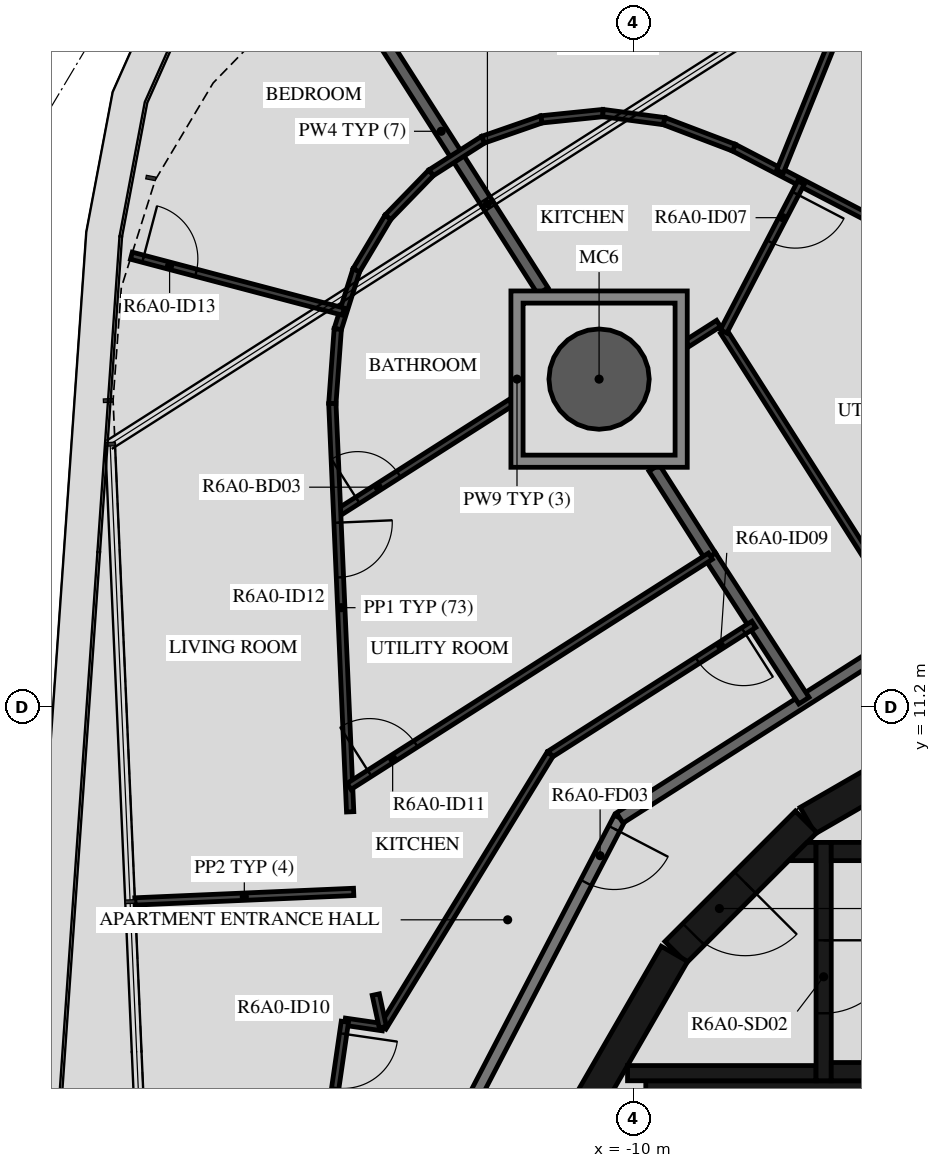
"""IFC4 building model, lengths in metres.
Left out: names, types, materials, properties, quantities, classifications, styles, units other than length and angle.
Written with IfcOpenShell. Run it as: python <this file> out.ifc"""

import sys

from ifc_helpers import new_model, si_unit, direction, frame, frame_2d, origin, origin_2d, place, context, subcontext, project, spatial, polyline, rectangle, hollow_circle, outline, extrude, element, fill, save


model = new_model("IFC4")
c1 = context("Model", 3, precision=1e-05, world=origin(), true_north=direction((0.0, 1.0)))
c2 = subcontext(c1, "Body", "Model", "MODEL_VIEW")
j1 = project(units=[si_unit("LENGTHUNIT", "METRE"), si_unit("PLANEANGLEUNIT", "RADIAN")], contexts=[c1])
p1 = place(None, origin())
s1 = spatial("IfcSite", under=j1, at=p1, CompositionType="ELEMENT")
p2 = place(p1, origin())
s2 = spatial("IfcBuilding", under=s1, at=p2, CompositionType="ELEMENT")
p3 = place(p2, frame((0.0, 0.0, 226.7)))
s3 = spatial("IfcBuildingStorey", under=s2, at=p3, CompositionType="ELEMENT", Elevation=226.7)
p4 = place(p3, frame((-10.568, 16.588, -0.45), z_axis=(0.0, 0.0, 1.0), x_axis=(1.0, 0.0, 0.0)))
e1 = element("IfcColumn", 1, at=p4, inside=s3, PredefinedType="COLUMN", context=c2, shape_type="SweptSolid", body=[
    extrude(hollow_circle(Radius=0.825, WallThickness=0.04, at=origin_2d()), origin(), (0.0, 0.0, 1.0), 3.57),
])
p5 = place(p3, frame((-4.51, 10.845, 0.0), z_axis=(0.0, 0.0, 1.0), x_axis=(-0.865975092491, -0.500087131594, 0.0)))
e2 = element("IfcWall", 2, at=p5, inside=s3, PredefinedType="SHEAR", context=c2, shape_type="SweptSolid", body=[
    extrude(rectangle(XDim=3.033, YDim=0.5, at=frame_2d((1.516, 0.0))), origin(), (0.0, 0.0, 1.0), 3.12),
])
p6 = place(p3, frame((-7.164, 9.308, 0.0), z_axis=(0.0, 0.0, 1.0), x_axis=(-0.707106781187, -0.707106781187, 0.0)))
e3 = element("IfcWall", 3, at=p6, inside=s3, PredefinedType="SHEAR", context=c2, shape_type="SweptSolid", body=[
    extrude(rectangle(XDim=3.032, YDim=0.5, at=frame_2d((1.516, 0.0))), origin(), (0.0, 0.0, 1.0), 3.12),
])
p7 = place(p6, frame((1.416, 0.0, 0.0)))
e4 = element("IfcOpeningElement", 4, at=p7, cuts=e3, PredefinedType="OPENING", context=c2, shape_type="SweptSolid", body=[
    extrude(rectangle(XDim=1.2, YDim=2.1, at=frame_2d((0.6, 1.05))), frame((0.0, 0.26, 0.0), z_axis=(0.0, -1.0, 0.0), x_axis=(1.0, 0.0, 0.0)), (0.0, 0.0, 1.0), 0.52),
])
p8 = place(p3, frame((-9.329, 7.137, 0.0), z_axis=(0.0, 0.0, 1.0), x_axis=(-0.500087131594, -0.865975092491, 0.0)))
e5 = element("IfcWall", 5, at=p8, inside=s3, PredefinedType="SHEAR", context=c2, shape_type="SweptSolid", body=[
    extrude(rectangle(XDim=3.033, YDim=0.5, at=frame_2d((1.516, 0.0))), origin(), (0.0, 0.0, 1.0), 3.12),
])
for number, where, z_axis, x_axis in (
    (6, (-6.75, 5.2, 0.0), (0.0, 0.0, 1.0), (1.0, 0.0, 0.0)),
    (7, (-6.75, 8.82, 0.0), (0.0, 0.0, 1.0), (1.0, 0.0, 0.0)),
):
    element("IfcWall", number, at=place(p3, frame(where, z_axis=z_axis, x_axis=x_axis)), inside=s3, PredefinedType="SHEAR", context=c2, shape_type="SweptSolid", body=[
        extrude(rectangle(XDim=6.75, YDim=0.3, at=frame_2d((3.375, 0.0))), origin(), (0.0, 0.0, 1.0), 3.12),
    ])
p9 = place(p3, frame((-6.875, 8.97, 0.0), z_axis=(0.0, 0.0, 1.0), x_axis=(0.0, -1.0, 0.0)))
e8 = element("IfcWall", 8, at=p9, inside=s3, PredefinedType="SHEAR", context=c2, shape_type="SweptSolid", body=[
    extrude(rectangle(XDim=3.92, YDim=0.25, at=frame_2d((1.96, 0.0))), origin(), (0.0, 0.0, 1.0), 3.12),
])
p10 = place(p9, frame((1.61, 0.0, 0.0)))
e9 = element("IfcOpeningElement", 9, at=p10, cuts=e8, PredefinedType="OPENING", context=c2, shape_type="SweptSolid", body=[
    extrude(rectangle(XDim=1.2, YDim=2.1, at=frame_2d((0.6, 1.05))), frame((0.0, 0.135, 0.0), z_axis=(0.0, -1.0, 0.0), x_axis=(1.0, 0.0, 0.0)), (0.0, 0.0, 1.0), 0.27),
])
p11 = place(p3, frame((-7.0, 5.175, 0.0), z_axis=(0.0, 0.0, 1.0), x_axis=(-1.0, 0.0, 0.0)))
e10 = element("IfcWall", 10, at=p11, inside=s3, PredefinedType="SHEAR", context=c2, shape_type="SweptSolid", body=[
    extrude(rectangle(XDim=3.1, YDim=0.25, at=frame_2d((1.55, 0.0))), origin(), (0.0, 0.0, 1.0), 3.12),
])
p12 = place(p3, origin())
e11 = element("IfcWall", 11, at=p12, inside=s3, PredefinedType="SHEAR", context=c2, shape_type="SweptSolid", body=[
    extrude(outline(polyline([(-7.148, 8.97), (-7.0, 8.97), (-7.0, 8.67), (-7.448, 8.67), (-7.148, 8.97)])), origin(), (0.0, 0.0, 1.0), 3.12),
])
p13 = place(p3, origin())
e12 = element("IfcWall", 12, at=p13, inside=s3, PredefinedType="SHEAR", context=c2, shape_type="SweptSolid", body=[
    extrude(outline(polyline([(-9.55, 4.8), (-5.5, 4.8), (-5.5, 1.9), (-5.25, 1.9), (-5.25, 4.8), (-1.2, 4.8), (-1.2, 1.9), (-0.95, 1.9), (-0.95, 4.8), (0.95, 4.8), (0.95, 1.9), (1.2, 1.9), (1.2, 4.8), (3.1, 4.8), (3.1, 1.9), (3.35, 1.9), (3.35, 4.8), (5.25, 4.8), (5.25, 1.9), (5.5, 1.9), (5.5, 4.8), (7.4, 4.8), (7.4, 1.9), (7.65, 1.9), (7.65, 4.8), (9.55, 4.8), (9.55, 1.9), (9.8, 1.9), (9.8, 4.8), (9.8, 5.05), (-9.8, 5.05), (-9.8, 4.8), (-9.8, 1.9), (-9.55, 1.9), (-9.55, 4.8)])), origin(), (0.0, 0.0, 1.0), 3.12),
])
p14 = place(p3, frame((-10.228, 9.372, 0.0), z_axis=(0.0, 0.0, 1.0), x_axis=(-0.461759464021, -0.887005184532, 0.0)))
e13 = element("IfcWall", 13, at=p14, inside=s3, PredefinedType="STANDARD", context=c2, shape_type="SweptSolid", body=[
    extrude(rectangle(XDim=7.181, YDim=0.2, at=frame_2d((3.591, 0.0))), origin(), (0.0, 0.0, 1.0), 3.12),
])
p15 = place(p14, frame((0.2, 0.0, 0.0)))
e14 = element("IfcOpeningElement", 14, at=p15, cuts=e13, PredefinedType="OPENING", context=c2, shape_type="SweptSolid", body=[
    extrude(rectangle(XDim=1.0, YDim=2.1, at=frame_2d((0.5, 1.05))), frame((0.0, 0.11, 0.0), z_axis=(0.0, -1.0, 0.0), x_axis=(1.0, 0.0, 0.0)), (0.0, 0.0, 1.0), 0.22),
])
p16 = place(p3, frame((-4.172, 13.231, 0.0), z_axis=(0.0, 0.0, 1.0), x_axis=(-0.843388394728, -0.537304397561, 0.0)))
e15 = element("IfcWall", 15, at=p16, inside=s3, PredefinedType="STANDARD", context=c2, shape_type="SweptSolid", body=[
    extrude(rectangle(XDim=7.181, YDim=0.2, at=frame_2d((3.59, 0.0))), origin(), (0.0, 0.0, 1.0), 3.12),
])
p17 = place(p3, frame((-8.738, 13.677, 0.0), z_axis=(0.0, 0.0, 1.0), x_axis=(0.54358037296, -0.839357121929, 0.0)))
e16 = element("IfcWall", 16, at=p17, inside=s3, PredefinedType="STANDARD", context=c2, shape_type="SweptSolid", body=[
    extrude(rectangle(XDim=2.83, YDim=0.2, at=frame_2d((1.415, 0.0))), origin(), (0.0, 0.0, 1.0), 3.12),
])
p18 = place(p3, frame((-9.663, 15.129, 0.0), z_axis=(0.0, 0.0, 1.0), x_axis=(0.537205715853, -0.843451254581, 0.0)))
e17 = element("IfcWall", 17, at=p18, inside=s3, PredefinedType="STANDARD", context=c2, shape_type="SweptSolid", body=[
    extrude(rectangle(XDim=1.722, YDim=0.2, at=frame_2d((0.861, 0.0))), origin(), (0.0, 0.0, 1.0), 3.12),
])
p19 = place(p3, frame((-14.837, 23.29, 0.0), z_axis=(0.0, 0.0, 1.0), x_axis=(0.537316863221, -0.843380452998, 0.0)))
e18 = element("IfcWall", 18, at=p19, inside=s3, PredefinedType="STANDARD", context=c2, shape_type="SweptSolid", body=[
    extrude(rectangle(XDim=6.227, YDim=0.2, at=frame_2d((3.113, 0.0))), origin(), (0.0, 0.0, 1.0), 3.12),
])
p20 = place(p3, frame((-6.194, 13.721, 0.0), z_axis=(0.0, 0.0, 1.0), x_axis=(-0.537316807294, 0.843380488629, 0.0)))
e19 = element("IfcWall", 19, at=p20, inside=s3, PredefinedType="PARTITIONING", context=c2, shape_type="SweptSolid", body=[
    extrude(rectangle(XDim=4.331, YDim=0.12, at=frame_2d((2.165, 0.0))), origin(), (0.0, 0.0, 1.0), 3.12),
])
p21 = place(p3, frame((-8.604, 17.504, 0.0), z_axis=(0.0, 0.0, 1.0), x_axis=(-0.843265746233, -0.537496866251, 0.0)))
e20 = element("IfcWall", 20, at=p21, inside=s3, PredefinedType="PARTITIONING", context=c2, shape_type="SweptSolid", body=[
    extrude(rectangle(XDim=0.61, YDim=0.12, at=frame_2d((0.305, 0.0))), origin(), (0.0, 0.0, 1.0), 3.12),
])
p22 = place(p3, frame((-8.35, 20.394, 0.0), z_axis=(0.0, 0.0, 1.0), x_axis=(0.887020940825, -0.461729196107, 0.0)))
e21 = element("IfcWall", 21, at=p22, inside=s3, PredefinedType="PARTITIONING", context=c2, shape_type="SweptSolid", body=[
    extrude(rectangle(XDim=11.678, YDim=0.12, at=frame_2d((5.839, 0.0))), origin(), (0.0, 0.0, 1.0), 3.12),
])
p23 = place(p3, frame((-6.237, 23.353, 0.0), z_axis=(0.0, 0.0, 1.0), x_axis=(-0.375089171101, -0.92698873441, 0.0)))
e22 = element("IfcWall", 22, at=p23, inside=s3, PredefinedType="PARTITIONING", context=c2, shape_type="SweptSolid", body=[
    extrude(rectangle(XDim=3.616, YDim=0.12, at=frame_2d((1.808, 0.0))), origin(), (0.0, 0.0, 1.0), 2.73),
])
p24 = place(p23, frame((0.2, 0.0, 0.0)))
e23 = element("IfcOpeningElement", 23, at=p24, cuts=e22, PredefinedType="OPENING", context=c2, shape_type="SweptSolid", body=[
    extrude(rectangle(XDim=0.9, YDim=2.1, at=frame_2d((0.45, 1.05))), frame((0.0, 0.07, 0.0), z_axis=(0.0, -1.0, 0.0), x_axis=(1.0, 0.0, 0.0)), (0.0, 0.0, 1.0), 0.14),
])
p25 = place(p3, frame((-7.247, 19.82, 0.0), z_axis=(0.0, 0.0, 1.0), x_axis=(-0.46174004932, -0.887015291218, 0.0)))
e24 = element("IfcWall", 24, at=p25, inside=s3, PredefinedType="PARTITIONING", context=c2, shape_type="SweptSolid", body=[
    extrude(rectangle(XDim=2.759, YDim=0.12, at=frame_2d((1.379, 0.0))), origin(), (0.0, 0.0, 1.0), 3.12),
])
p26 = place(p25, frame((0.2, 0.0, 0.0)))
e25 = element("IfcOpeningElement", 25, at=p26, cuts=e24, PredefinedType="OPENING", context=c2, shape_type="SweptSolid", body=[
    extrude(rectangle(XDim=0.9, YDim=2.1, at=frame_2d((0.45, 1.05))), frame((0.0, 0.07, 0.0), z_axis=(0.0, -1.0, 0.0), x_axis=(1.0, 0.0, 0.0)), (0.0, 0.0, 1.0), 0.14),
])
for number, where, z_axis, x_axis in (
    (26, (-13.332, 19.981, 0.0), (0.0, 0.0, 1.0), (0.843, 0.537, 0.0)),
    (27, (-12.475, 20.527, 0.0), (0.0, 0.0, 1.0), (0.945, 0.328, 0.0)),
):
    element("IfcWall", number, at=place(p3, frame(where, z_axis=z_axis, x_axis=x_axis)), inside=s3, PredefinedType="PARTITIONING", context=c2, shape_type="SweptSolid", body=[
        extrude(rectangle(XDim=1.016, YDim=0.12, at=frame_2d((0.508, 0.0))), origin(), (0.0, 0.0, 1.0), 3.12),
    ])
p27 = place(p3, frame((-11.515, 20.86, 0.0), z_axis=(0.0, 0.0, 1.0), x_axis=(0.994818278641, 0.101669034034, 0.0)))
e28 = element("IfcWall", 28, at=p27, inside=s3, PredefinedType="PARTITIONING", context=c2, shape_type="SweptSolid", body=[
    extrude(rectangle(XDim=1.016, YDim=0.12, at=frame_2d((0.508, 0.0))), origin(), (0.0, 0.0, 1.0), 3.12),
])
p28 = place(p3, frame((-10.504, 20.963, 0.0), z_axis=(0.0, 0.0, 1.0), x_axis=(0.991451023706, -0.13047937612, 0.0)))
e29 = element("IfcWall", 29, at=p28, inside=s3, PredefinedType="PARTITIONING", context=c2, shape_type="SweptSolid", body=[
    extrude(rectangle(XDim=1.016, YDim=0.12, at=frame_2d((0.508, 0.0))), origin(), (0.0, 0.0, 1.0), 3.12),
])
p29 = place(p3, frame((-9.497, 20.831, 0.0), z_axis=(0.0, 0.0, 1.0), x_axis=(0.934575963521, -0.355763641213, 0.0)))
e30 = element("IfcWall", 30, at=p29, inside=s3, PredefinedType="PARTITIONING", context=c2, shape_type="SweptSolid", body=[
    extrude(rectangle(XDim=1.227, YDim=0.12, at=frame_2d((0.614, 0.0))), origin(), (0.0, 0.0, 1.0), 3.12),
])
p30 = place(p3, frame((-8.023, 12.555, 0.0), z_axis=(0.0, 0.0, 1.0), x_axis=(-0.843408270233, -0.537273198385, 0.0)))
e31 = element("IfcWall", 31, at=p30, inside=s3, PredefinedType="PARTITIONING", context=c2, shape_type="SweptSolid", body=[
    extrude(rectangle(XDim=3.971, YDim=0.12, at=frame_2d((1.986, 0.0))), origin(), (0.0, 0.0, 1.0), 3.12),
])
p31 = place(p30, frame((0.2, 0.0, 0.0)))
e32 = element("IfcOpeningElement", 32, at=p31, cuts=e31, PredefinedType="OPENING", context=c2, shape_type="SweptSolid", body=[
    extrude(rectangle(XDim=0.9, YDim=2.1, at=frame_2d((0.45, 1.05))), frame((0.0, 0.07, 0.0), z_axis=(0.0, -1.0, 0.0), x_axis=(1.0, 0.0, 0.0)), (0.0, 0.0, 1.0), 0.14),
])
p32 = place(p3, frame((-11.373, 10.421, 0.0), z_axis=(0.0, 0.0, 1.0), x_axis=(-0.522435957358, -0.852678527031, 0.0)))
e33 = element("IfcWall", 33, at=p32, inside=s3, PredefinedType="PARTITIONING", context=c2, shape_type="SweptSolid", body=[
    extrude(rectangle(XDim=5.267, YDim=0.12, at=frame_2d((2.633, 0.0))), origin(), (0.0, 0.0, 1.0), 3.12),
])
p33 = place(p3, frame((-14.125, 5.931, 0.0), z_axis=(0.0, 0.0, 1.0), x_axis=(-0.989621518838, 0.143698467119, 0.0)))
e34 = element("IfcWall", 34, at=p33, inside=s3, PredefinedType="PARTITIONING", context=c2, shape_type="SweptSolid", body=[
    extrude(rectangle(XDim=0.63, YDim=0.12, at=frame_2d((0.315, 0.0))), origin(), (0.0, 0.0, 1.0), 3.12),
])
p34 = place(p3, frame((-14.748, 6.021, 0.0), z_axis=(0.0, 0.0, 1.0), x_axis=(-0.143888945672, -0.98959384159, 0.0)))
e35 = element("IfcWall", 35, at=p34, inside=s3, PredefinedType="PARTITIONING", context=c2, shape_type="SweptSolid", body=[
    extrude(rectangle(XDim=1.537, YDim=0.12, at=frame_2d((0.769, 0.0))), origin(), (0.0, 0.0, 1.0), 3.12),
])
p35 = place(p34, frame((0.2, 0.0, 0.0)))
e36 = element("IfcOpeningElement", 36, at=p35, cuts=e35, PredefinedType="OPENING", context=c2, shape_type="SweptSolid", body=[
    extrude(rectangle(XDim=0.9, YDim=2.1, at=frame_2d((0.45, 1.05))), frame((0.0, 0.07, 0.0), z_axis=(0.0, -1.0, 0.0), x_axis=(1.0, 0.0, 0.0)), (0.0, 0.0, 1.0), 0.14),
])
for number, where, z_axis, x_axis in (
    (37, (-14.865, 17.411, 0.0), (0.0, 0.0, 1.0), (0.301, 0.954, 0.0)),
    (38, (-14.56, 18.38, 0.0), (0.0, 0.0, 1.0), (0.513, 0.859, 0.0)),
    (39, (-14.039, 19.252, 0.0), (0.0, 0.0, 1.0), (0.697, 0.717, 0.0)),
):
    element("IfcWall", number, at=place(p3, frame(where, z_axis=z_axis, x_axis=x_axis)), inside=s3, PredefinedType="PARTITIONING", context=c2, shape_type="SweptSolid", body=[
        extrude(rectangle(XDim=1.016, YDim=0.12, at=frame_2d((0.508, 0.0))), origin(), (0.0, 0.0, 1.0), 3.12),
    ])
p36 = place(p3, frame((-18.26, 18.618, 0.0), z_axis=(0.0, 0.0, 1.0), x_axis=(0.96689176932, -0.25518680691, 0.0)))
e40 = element("IfcWall", 40, at=p36, inside=s3, PredefinedType="PARTITIONING", context=c2, shape_type="SweptSolid", body=[
    extrude(rectangle(XDim=3.604, YDim=0.12, at=frame_2d((1.802, 0.0))), origin(), (0.0, 0.0, 1.0), 3.12),
])
p37 = place(p36, frame((0.2, 0.0, 0.0)))
e41 = element("IfcOpeningElement", 41, at=p37, cuts=e40, PredefinedType="OPENING", context=c2, shape_type="SweptSolid", body=[
    extrude(rectangle(XDim=0.9, YDim=2.1, at=frame_2d((0.45, 1.05))), frame((0.0, 0.07, 0.0), z_axis=(0.0, -1.0, 0.0), x_axis=(1.0, 0.0, 0.0)), (0.0, 0.0, 1.0), 0.14),
])
p38 = place(p3, frame((-14.876, 14.382, 0.0), z_axis=(0.0, 0.0, 1.0), x_axis=(0.843409222082, 0.537271704175, 0.0)))
e42 = element("IfcWall", 42, at=p38, inside=s3, PredefinedType="PARTITIONING", context=c2, shape_type="SweptSolid", body=[
    extrude(rectangle(XDim=3.388, YDim=0.12, at=frame_2d((1.694, 0.0))), origin(), (0.0, 0.0, 1.0), 3.12),
])
p39 = place(p38, frame((0.4, 0.0, 0.0)))
e43 = element("IfcOpeningElement", 43, at=p39, cuts=e42, PredefinedType="OPENING", context=c2, shape_type="SweptSolid", body=[
    extrude(rectangle(XDim=0.8, YDim=2.1, at=frame_2d((0.4, 1.05))), frame((0.0, 0.07, 0.0), z_axis=(0.0, -1.0, 0.0), x_axis=(1.0, 0.0, 0.0)), (0.0, 0.0, 1.0), 0.14),
])
p40 = place(p3, frame((-14.865, 17.411, 0.0), z_axis=(0.0, 0.0, 1.0), x_axis=(-0.072618457011, -0.997359794508, 0.0)))
e44 = element("IfcWall", 44, at=p40, inside=s3, PredefinedType="PARTITIONING", context=c2, shape_type="SweptSolid", body=[
    extrude(rectangle(XDim=1.227, YDim=0.12, at=frame_2d((0.614, 0.0))), origin(), (0.0, 0.0, 1.0), 3.12),
])
p41 = place(p3, frame((-14.955, 16.187, 0.0), z_axis=(0.0, 0.0, 1.0), x_axis=(0.043591713888, -0.999049429448, 0.0)))
e45 = element("IfcWall", 45, at=p41, inside=s3, PredefinedType="PARTITIONING", context=c2, shape_type="SweptSolid", body=[
    extrude(rectangle(XDim=6.721, YDim=0.12, at=frame_2d((3.36, 0.0))), origin(), (0.0, 0.0, 1.0), 3.12),
])
p42 = place(p41, frame((1.961, 0.0, 0.0)))
e46 = element("IfcOpeningElement", 46, at=p42, cuts=e45, PredefinedType="OPENING", context=c2, shape_type="SweptSolid", body=[
    extrude(rectangle(XDim=0.9, YDim=2.1, at=frame_2d((0.45, 1.05))), frame((0.0, 0.07, 0.0), z_axis=(0.0, -1.0, 0.0), x_axis=(1.0, 0.0, 0.0)), (0.0, 0.0, 1.0), 0.14),
])
p43 = place(p3, frame((-14.68, 9.891, 0.0), z_axis=(0.0, 0.0, 1.0), x_axis=(0.843391697183, 0.537299213774, 0.0)))
e47 = element("IfcWall", 47, at=p43, inside=s3, PredefinedType="PARTITIONING", context=c2, shape_type="SweptSolid", body=[
    extrude(rectangle(XDim=7.045, YDim=0.12, at=frame_2d((3.522, 0.0))), origin(), (0.0, 0.0, 1.0), 3.12),
])
p44 = place(p43, frame((0.4, 0.0, 0.0)))
e48 = element("IfcOpeningElement", 48, at=p44, cuts=e47, PredefinedType="OPENING", context=c2, shape_type="SweptSolid", body=[
    extrude(rectangle(XDim=0.9, YDim=2.1, at=frame_2d((0.45, 1.05))), frame((0.0, 0.07, 0.0), z_axis=(0.0, -1.0, 0.0), x_axis=(1.0, 0.0, 0.0)), (0.0, 0.0, 1.0), 0.14),
])
p45 = place(p3, frame((-14.24, 6.467, 0.0), z_axis=(0.0, 0.0, 1.0), x_axis=(0.210896225868, -0.977508456186, 0.0)))
e49 = element("IfcWall", 49, at=p45, inside=s3, PredefinedType="PARTITIONING", context=c2, shape_type="SweptSolid", body=[
    extrude(rectangle(XDim=0.549, YDim=0.12, at=frame_2d((0.274, 0.0))), origin(), (0.0, 0.0, 1.0), 3.12),
])
p46 = place(p3, frame((-18.201, 7.999, 0.0), z_axis=(0.0, 0.0, 1.0), x_axis=(0.999048850974, 0.043604969534, 0.0)))
e50 = element("IfcWall", 50, at=p46, inside=s3, PredefinedType="PARTITIONING", context=c2, shape_type="SweptSolid", body=[
    extrude(rectangle(XDim=3.6, YDim=0.12, at=frame_2d((1.8, 0.0))), origin(), (0.0, 0.0, 1.0), 2.73),
])
p47 = place(p3, origin())
e51 = element("IfcWall", 51, at=p47, inside=s3, PredefinedType="STANDARD", context=c2, shape_type="SweptSolid", body=[
    extrude(outline(polyline([(-9.118, 18.038), (-9.118, 15.138), (-12.018, 15.138), (-12.018, 18.038), (-9.118, 18.038)]), holes=[polyline([(-11.818, 15.338), (-9.318, 15.338), (-9.318, 17.838), (-11.818, 17.838), (-11.818, 15.338)])]), origin(), (0.0, 0.0, 1.0), 3.12),
])
p48 = place(p10, origin())
e52 = element("IfcDoor", 52, at=p48, inside=s3, OperationType="SINGLE_SWING_LEFT", PredefinedType="DOOR", context=c2, shape_type="SweptSolid", body=[
    extrude(rectangle(XDim=1.2, YDim=2.1, at=frame_2d((0.6, 1.05))), frame((0.0, 0.025, 0.0), z_axis=(0.0, -1.0, 0.0), x_axis=(1.0, 0.0, 0.0)), (0.0, 0.0, 1.0), 0.05),
])
fill(e9, e52)
p49 = place(p7, origin())
e53 = element("IfcDoor", 53, at=p49, inside=s3, OperationType="SINGLE_SWING_RIGHT", PredefinedType="DOOR", context=c2, shape_type="SweptSolid", body=[
    extrude(rectangle(XDim=1.2, YDim=2.1, at=frame_2d((0.6, 1.05))), frame((0.0, 0.025, 0.0), z_axis=(0.0, -1.0, 0.0), x_axis=(1.0, 0.0, 0.0)), (0.0, 0.0, 1.0), 0.05),
])
fill(e4, e53)
p50 = place(p26, origin())
e54 = element("IfcDoor", 54, at=p50, inside=s3, OperationType="SINGLE_SWING_RIGHT", PredefinedType="DOOR", context=c2, shape_type="SweptSolid", body=[
    extrude(rectangle(XDim=0.9, YDim=2.1, at=frame_2d((0.45, 1.05))), frame((0.0, 0.025, 0.0), z_axis=(0.0, -1.0, 0.0), x_axis=(1.0, 0.0, 0.0)), (0.0, 0.0, 1.0), 0.05),
])
fill(e25, e54)
p51 = place(p15, origin())
e55 = element("IfcDoor", 55, at=p51, inside=s3, OperationType="SINGLE_SWING_LEFT", PredefinedType="DOOR", context=c2, shape_type="SweptSolid", body=[
    extrude(rectangle(XDim=1.0, YDim=2.1, at=frame_2d((0.5, 1.05))), frame((0.0, 0.025, 0.0), z_axis=(0.0, -1.0, 0.0), x_axis=(1.0, 0.0, 0.0)), (0.0, 0.0, 1.0), 0.05),
])
fill(e14, e55)
p52 = place(p31, origin())
e56 = element("IfcDoor", 56, at=p52, inside=s3, OperationType="SINGLE_SWING_LEFT", PredefinedType="DOOR", context=c2, shape_type="SweptSolid", body=[
    extrude(rectangle(XDim=0.9, YDim=2.1, at=frame_2d((0.45, 1.05))), frame((0.0, 0.025, 0.0), z_axis=(0.0, -1.0, 0.0), x_axis=(1.0, 0.0, 0.0)), (0.0, 0.0, 1.0), 0.05),
])
fill(e32, e56)
p53 = place(p35, origin())
e57 = element("IfcDoor", 57, at=p53, inside=s3, OperationType="SINGLE_SWING_LEFT", PredefinedType="DOOR", context=c2, shape_type="SweptSolid", body=[
    extrude(rectangle(XDim=0.9, YDim=2.1, at=frame_2d((0.45, 1.05))), frame((0.0, 0.025, 0.0), z_axis=(0.0, -1.0, 0.0), x_axis=(1.0, 0.0, 0.0)), (0.0, 0.0, 1.0), 0.05),
])
fill(e36, e57)
p54 = place(p44, origin())
e58 = element("IfcDoor", 58, at=p54, inside=s3, OperationType="SINGLE_SWING_LEFT", PredefinedType="DOOR", context=c2, shape_type="SweptSolid", body=[
    extrude(rectangle(XDim=0.9, YDim=2.1, at=frame_2d((0.45, 1.05))), frame((0.0, 0.025, 0.0), z_axis=(0.0, -1.0, 0.0), x_axis=(1.0, 0.0, 0.0)), (0.0, 0.0, 1.0), 0.05),
])
fill(e48, e58)
p55 = place(p39, origin())
e59 = element("IfcDoor", 59, at=p55, inside=s3, OperationType="SINGLE_SWING_LEFT", PredefinedType="DOOR", context=c2, shape_type="SweptSolid", body=[
    extrude(rectangle(XDim=0.8, YDim=2.1, at=frame_2d((0.4, 1.05))), frame((0.0, 0.025, 0.0), z_axis=(0.0, -1.0, 0.0), x_axis=(1.0, 0.0, 0.0)), (0.0, 0.0, 1.0), 0.05),
])
fill(e43, e59)
p56 = place(p42, origin())
e60 = element("IfcDoor", 60, at=p56, inside=s3, OperationType="SINGLE_SWING_LEFT", PredefinedType="DOOR", context=c2, shape_type="SweptSolid", body=[
    extrude(rectangle(XDim=0.9, YDim=2.1, at=frame_2d((0.45, 1.05))), frame((0.0, 0.025, 0.0), z_axis=(0.0, -1.0, 0.0), x_axis=(1.0, 0.0, 0.0)), (0.0, 0.0, 1.0), 0.05),
])
fill(e46, e60)
p57 = place(p37, origin())
e61 = element("IfcDoor", 61, at=p57, inside=s3, OperationType="SINGLE_SWING_LEFT", PredefinedType="DOOR", context=c2, shape_type="SweptSolid", body=[
    extrude(rectangle(XDim=0.9, YDim=2.1, at=frame_2d((0.45, 1.05))), frame((0.0, 0.025, 0.0), z_axis=(0.0, -1.0, 0.0), x_axis=(1.0, 0.0, 0.0)), (0.0, 0.0, 1.0), 0.05),
])
fill(e41, e61)
save(model, sys.argv[1])
